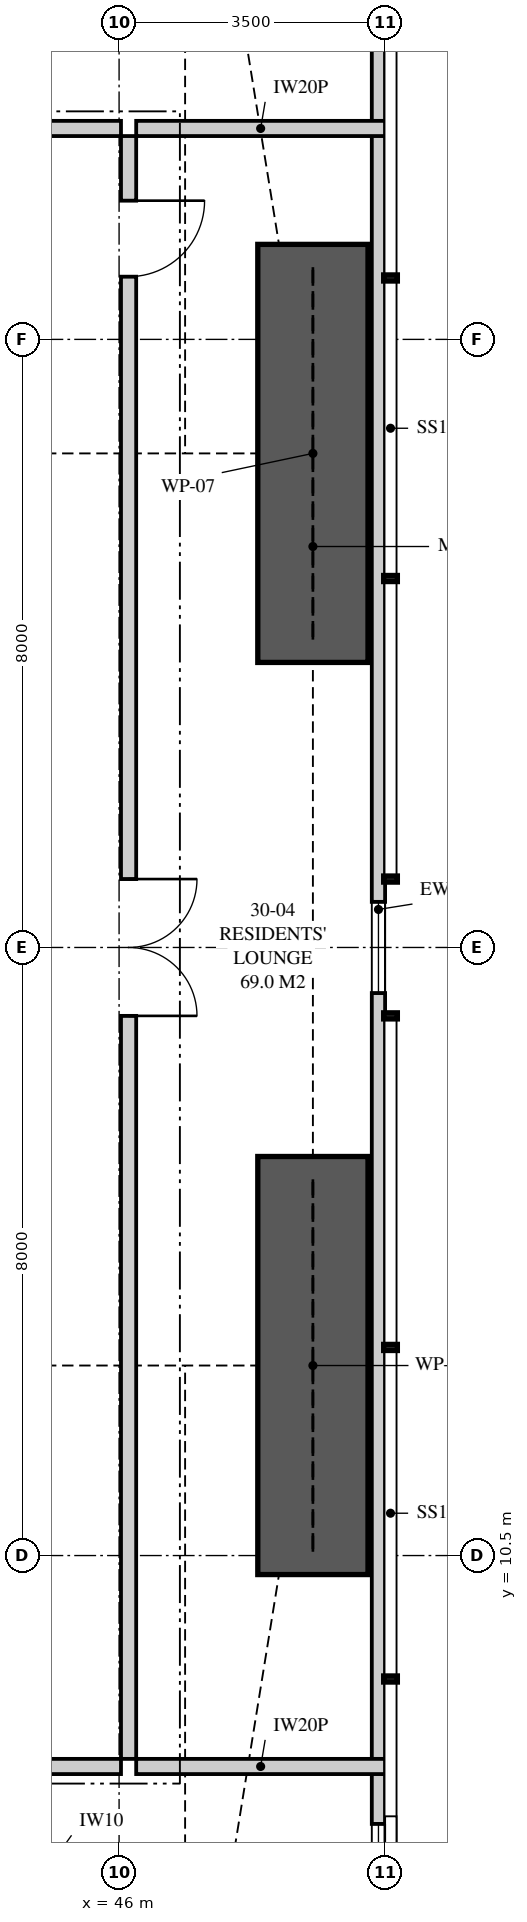
"""IFC4 building model, lengths in metres.
Left out: names, types, materials, properties, quantities, classifications, styles, units other than length and angle.
Written with IfcOpenShell. Run it as: python <this file> out.ifc"""

import sys

from ifc_helpers import new_model, si_unit, direction, frame, frame_2d, origin, place, context, subcontext, project, spatial, polyline, rectangle, outline, extrude, element, fill, save


model = new_model("IFC4")
c1 = context("Model", 3, precision=1e-05, world=origin(), true_north=direction((0.0, 1.0)))
c2 = subcontext(c1, "Body", "Model", "MODEL_VIEW")
j1 = project(units=[si_unit("LENGTHUNIT", "METRE"), si_unit("PLANEANGLEUNIT", "RADIAN")], contexts=[c1])
p1 = place(None, origin())
s1 = spatial("IfcSite", under=j1, at=p1, CompositionType="ELEMENT")
p2 = place(p1, origin())
s2 = spatial("IfcBuilding", under=s1, at=p2, CompositionType="ELEMENT")
p3 = place(p2, frame((0.0, 0.0, 111.55)))
s3 = spatial("IfcBuildingStorey", under=s2, at=p3, CompositionType="ELEMENT", Elevation=111.55)
p4 = place(p3, frame((49.413, 3.051, 0.0), z_axis=(0.0, 0.0, 1.0), x_axis=(0.0, 1.0, 0.0)))
e1 = element("IfcWall", 1, at=p4, inside=s3, PredefinedType="SOLIDWALL", context=c2, shape_type="SweptSolid", body=[
    extrude(outline(polyline([(0.0, 0.0), (31.897, 0.0), (31.897, 3.11), (22.167, 3.11), (22.167, 2.15), (22.074, 2.15), (22.074, 3.11), (21.949, 3.11), (21.949, 2.15), (9.949, 2.15), (9.949, 3.11), (9.823, 3.11), (9.823, 2.15), (9.73, 2.15), (9.73, 3.11), (0.0, 3.11), (0.0, 0.0)])), frame((0.0, 0.087, 0.0), z_axis=(0.0, -1.0, 0.0), x_axis=(1.0, 0.0, 0.0)), (0.0, 0.0, 1.0), 0.175),
])
p5 = place(p4, frame((2.118, 0.0, 0.4)))
e2 = element("IfcOpeningElement", 2, at=p5, cuts=e1, PredefinedType="OPENING", context=c2, shape_type="SweptSolid", body=[
    extrude(rectangle(XDim=1.8, YDim=1.7, at=frame_2d((0.9, 0.85))), frame((0.0, 0.097, 0.0), z_axis=(0.0, -1.0, 0.0), x_axis=(1.0, 0.0, 0.0)), (0.0, 0.0, 1.0), 0.195),
])
p6 = place(p4, frame((14.849, 0.0, 0.4)))
e3 = element("IfcOpeningElement", 3, at=p6, cuts=e1, PredefinedType="OPENING", context=c2, shape_type="SweptSolid", body=[
    extrude(rectangle(XDim=1.2, YDim=1.7, at=frame_2d((0.6, 0.85))), frame((0.0, 0.097, 0.0), z_axis=(0.0, -1.0, 0.0), x_axis=(1.0, 0.0, 0.0)), (0.0, 0.0, 1.0), 0.195),
])
p7 = place(p4, frame((28.51, 0.0, 0.4)))
e4 = element("IfcOpeningElement", 4, at=p7, cuts=e1, PredefinedType="OPENING", context=c2, shape_type="SweptSolid", body=[
    extrude(rectangle(XDim=1.2, YDim=1.7, at=frame_2d((0.6, 0.85))), frame((0.0, 0.097, 0.0), z_axis=(0.0, -1.0, 0.0), x_axis=(1.0, 0.0, 0.0)), (0.0, 0.0, 1.0), 0.195),
])
p8 = place(p3, frame((39.9, 7.725, 0.0), z_axis=(0.0, 0.0, 1.0), x_axis=(1.0, 0.0, 0.0)))
e5 = element("IfcWall", 5, at=p8, inside=s3, PredefinedType="PARTITIONING", context=c2, shape_type="SweptSolid", body=[
    extrude(rectangle(XDim=6.125, YDim=0.2, at=frame_2d((3.062, 0.0))), origin(), (0.0, 0.0, 1.0), 3.11),
])
p9 = place(p8, frame((1.3, 0.0, 0.0)))
e6 = element("IfcOpeningElement", 6, at=p9, cuts=e5, PredefinedType="OPENING", context=c2, shape_type="SweptSolid", body=[
    extrude(rectangle(XDim=1.05, YDim=2.2, at=frame_2d((0.525, 1.1))), frame((0.0, 0.11, 0.0), z_axis=(0.0, -1.0, 0.0), x_axis=(1.0, 0.0, 0.0)), (0.0, 0.0, 1.0), 0.22),
])
p10 = place(p3, frame((46.225, 7.725, 0.0), z_axis=(0.0, 0.0, 1.0), x_axis=(1.0, 0.0, 0.0)))
e7 = element("IfcWall", 7, at=p10, inside=s3, PredefinedType="PARTITIONING", context=c2, shape_type="SweptSolid", body=[
    extrude(outline(polyline([(0.0, 0.0), (3.275, 0.0), (3.275, 3.11), (2.392, 3.11), (2.392, 2.15), (0.643, 2.15), (0.643, 2.541), (0.306, 2.541), (0.306, 3.11), (0.0, 3.11), (0.0, 0.0)])), frame((0.0, 0.1, 0.0), z_axis=(0.0, -1.0, 0.0), x_axis=(1.0, 0.0, 0.0)), (0.0, 0.0, 1.0), 0.2),
])
p11 = place(p3, frame((40.75, 29.275, 0.0), z_axis=(0.0, 0.0, 1.0), x_axis=(1.0, 0.0, 0.0)))
e8 = element("IfcWall", 8, at=p11, inside=s3, PredefinedType="PARTITIONING", context=c2, shape_type="SweptSolid", body=[
    extrude(rectangle(XDim=5.275, YDim=0.2, at=frame_2d((2.637, 0.0))), origin(), (0.0, 0.0, 1.0), 3.11),
])
p12 = place(p11, frame((1.738, 0.0, 0.0)))
e9 = element("IfcOpeningElement", 9, at=p12, cuts=e8, PredefinedType="OPENING", context=c2, shape_type="SweptSolid", body=[
    extrude(rectangle(XDim=1.8, YDim=2.1, at=frame_2d((0.9, 1.05))), frame((0.0, 0.11, 0.0), z_axis=(0.0, -1.0, 0.0), x_axis=(1.0, 0.0, 0.0)), (0.0, 0.0, 1.0), 0.22),
])
p13 = place(p3, frame((46.225, 29.275, 0.0), z_axis=(0.0, 0.0, 1.0), x_axis=(1.0, 0.0, 0.0)))
e10 = element("IfcWall", 10, at=p13, inside=s3, PredefinedType="PARTITIONING", context=c2, shape_type="SweptSolid", body=[
    extrude(outline(polyline([(0.0, 0.0), (3.275, 0.0), (3.275, 3.11), (2.554, 3.11), (2.554, 2.15), (0.805, 2.15), (0.805, 2.541), (0.306, 2.541), (0.306, 3.11), (0.0, 3.11), (0.0, 0.0)])), frame((0.0, 0.1, 0.0), z_axis=(0.0, -1.0, 0.0), x_axis=(1.0, 0.0, 0.0)), (0.0, 0.0, 1.0), 0.2),
])
p14 = place(p3, frame((46.125, 7.825, 0.0), z_axis=(0.0, 0.0, 1.0), x_axis=(0.0, 1.0, 0.0)))
e11 = element("IfcWall", 11, at=p14, inside=s3, PredefinedType="PARTITIONING", context=c2, shape_type="SweptSolid", body=[
    extrude(outline(polyline([(0.0, 0.0), (21.35, 0.0), (21.35, 3.11), (17.512, 3.11), (17.512, 2.541), (16.838, 2.541), (16.838, 3.11), (5.512, 3.11), (5.512, 2.541), (4.838, 2.541), (4.838, 3.11), (0.0, 3.11), (0.0, 0.0)])), frame((0.0, 0.1, 0.0), z_axis=(0.0, -1.0, 0.0), x_axis=(1.0, 0.0, 0.0)), (0.0, 0.0, 1.0), 0.2),
])
p15 = place(p14, frame((9.775, 0.0, 0.0)))
e12 = element("IfcOpeningElement", 12, at=p15, cuts=e11, PredefinedType="OPENING", context=c2, shape_type="SweptSolid", body=[
    extrude(rectangle(XDim=1.8, YDim=2.1, at=frame_2d((0.9, 1.05))), frame((0.0, 0.11, 0.0), z_axis=(0.0, -1.0, 0.0), x_axis=(1.0, 0.0, 0.0)), (0.0, 0.0, 1.0), 0.22),
])
p16 = place(p14, frame((19.5, 0.0, 0.0)))
e13 = element("IfcOpeningElement", 13, at=p16, cuts=e11, PredefinedType="OPENING", context=c2, shape_type="SweptSolid", body=[
    extrude(rectangle(XDim=1.0, YDim=2.1, at=frame_2d((0.5, 1.05))), frame((0.0, 0.11, 0.0), z_axis=(0.0, -1.0, 0.0), x_axis=(1.0, 0.0, 0.0)), (0.0, 0.0, 1.0), 0.22),
])
for number, where, z_axis, x_axis in (
    (14, (48.55, 10.25, 0.0), (0.0, 0.0, 1.0), (0.0, 1.0, 0.0)),
    (15, (48.55, 22.25, 0.0), (0.0, 0.0, 1.0), (0.0, 1.0, 0.0)),
):
    element("IfcWall", number, at=place(p3, frame(where, z_axis=z_axis, x_axis=x_axis)), inside=s3, PredefinedType="SHEAR", context=c2, shape_type="SweptSolid", body=[
        extrude(rectangle(XDim=5.5, YDim=1.45, at=frame_2d((2.75, 0.0))), origin(), (0.0, 0.0, 1.0), 3.35),
    ])
p17 = place(p5, origin())
e16 = element("IfcWindow", 16, at=p17, inside=s3, PartitioningType="SINGLE_PANEL", PredefinedType="WINDOW", context=c2, shape_type="SweptSolid", body=[
    extrude(rectangle(XDim=1.8, YDim=1.7, at=frame_2d((0.9, 0.85))), frame((0.0, 0.03, 0.0), z_axis=(0.0, -1.0, 0.0), x_axis=(1.0, 0.0, 0.0)), (0.0, 0.0, 1.0), 0.06),
])
fill(e2, e16)
p18 = place(p6, origin())
e17 = element("IfcWindow", 17, at=p18, inside=s3, PartitioningType="SINGLE_PANEL", PredefinedType="WINDOW", context=c2, shape_type="SweptSolid", body=[
    extrude(rectangle(XDim=1.2, YDim=1.7, at=frame_2d((0.6, 0.85))), frame((0.0, 0.03, 0.0), z_axis=(0.0, -1.0, 0.0), x_axis=(1.0, 0.0, 0.0)), (0.0, 0.0, 1.0), 0.06),
])
fill(e3, e17)
p19 = place(p15, frame((1.8, 0.0, 0.0), z_axis=(0.0, 0.0, 1.0), x_axis=(-1.0, 0.0, 0.0)))
e18 = element("IfcDoor", 18, at=p19, inside=s3, OperationType="DOUBLE_DOOR_SINGLE_SWING", PredefinedType="DOOR", context=c2, shape_type="SweptSolid", body=[
    extrude(rectangle(XDim=1.8, YDim=2.1, at=frame_2d((0.9, 1.05))), frame((0.0, 0.025, 0.0), z_axis=(0.0, -1.0, 0.0), x_axis=(1.0, 0.0, 0.0)), (0.0, 0.0, 1.0), 0.05),
])
fill(e12, e18)
p20 = place(p16, frame((1.0, 0.0, 0.0), z_axis=(0.0, 0.0, 1.0), x_axis=(-1.0, 0.0, 0.0)))
e19 = element("IfcDoor", 19, at=p20, inside=s3, OperationType="SINGLE_SWING_LEFT", PredefinedType="DOOR", context=c2, shape_type="SweptSolid", body=[
    extrude(rectangle(XDim=1.0, YDim=2.1, at=frame_2d((0.5, 1.05))), frame((0.0, 0.025, 0.0), z_axis=(0.0, -1.0, 0.0), x_axis=(1.0, 0.0, 0.0)), (0.0, 0.0, 1.0), 0.05),
])
fill(e13, e19)
save(model, sys.argv[1])
